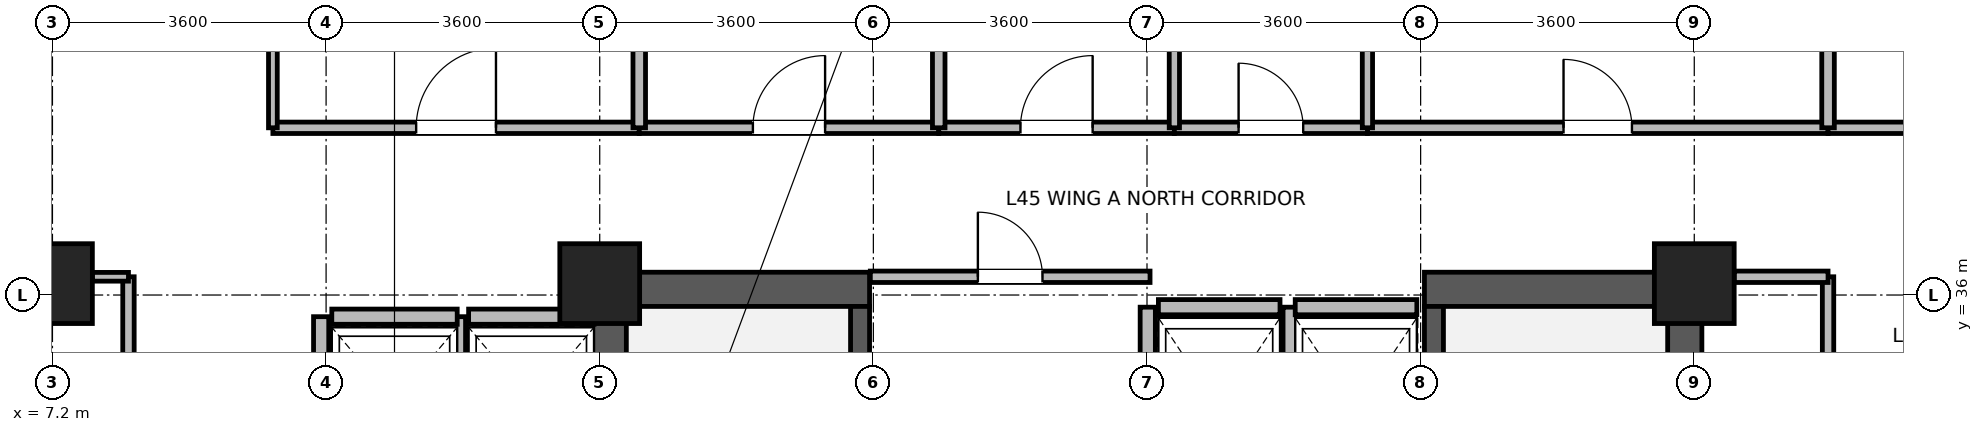
"""IFC4 building model, lengths in metres.
Left out: names, types, materials, properties, quantities, classifications, styles, units other than length and angle.
Written with IfcOpenShell. Run it as: python <this file> out.ifc"""

import sys

from ifc_helpers import new_model, si_unit, direction, frame, frame_2d, origin, origin_2d, place, context, subcontext, project, spatial, rectangle, extrude, source, transform, mapped, element, fill, save


model = new_model("IFC4")
c1 = context("Model", 3, precision=1e-05, world=origin(), true_north=direction((0.0, 1.0)))
c2 = subcontext(c1, "Body", "Model", "MODEL_VIEW")
j1 = project(units=[si_unit("LENGTHUNIT", "METRE"), si_unit("PLANEANGLEUNIT", "RADIAN")], contexts=[c1])
p1 = place(None, origin())
s1 = spatial("IfcSite", under=j1, at=p1, CompositionType="ELEMENT")
p2 = place(p1, origin())
s2 = spatial("IfcBuilding", under=s1, at=p2, CompositionType="ELEMENT")
p3 = place(p2, frame((0.0, 0.0, 177.2)))
s3 = spatial("IfcBuildingStorey", under=s2, at=p3, CompositionType="ELEMENT", Elevation=177.2)
for number, where, z_axis, x_axis in (
    (1, (14.525, 28.4, 0.0), (0.0, 0.0, 1.0), (0.0, 1.0, 0.0)),
    (2, (28.675, 28.4, 0.0), (0.0, 0.0, 1.0), (0.0, 1.0, 0.0)),
):
    element("IfcWall", number, at=place(p3, frame(where, z_axis=z_axis, x_axis=x_axis)), inside=s3, PredefinedType="SHEAR", context=c2, shape_type="SweptSolid", body=[
        extrude(rectangle(XDim=7.9, YDim=0.45, at=frame_2d((3.95, 0.0))), origin(), (0.0, 0.0, 1.0), 3.46),
    ])
for number, where, z_axis, x_axis in (
    (3, (14.75, 36.075, 0.0), (0.0, 0.0, 1.0), (1.0, 0.0, 0.0)),
    (4, (25.25, 36.075, 0.0), (0.0, 0.0, 1.0), (1.0, 0.0, 0.0)),
):
    element("IfcWall", number, at=place(p3, frame(where, z_axis=z_axis, x_axis=x_axis)), inside=s3, PredefinedType="SHEAR", context=c2, shape_type="SweptSolid", body=[
        extrude(rectangle(XDim=3.2, YDim=0.45, at=frame_2d((1.6, 0.0))), origin(), (0.0, 0.0, 1.0), 3.46),
    ])
p4 = place(p3, frame((17.825, 28.85, 0.0), z_axis=(0.0, 0.0, 1.0), x_axis=(0.0, 1.0, 0.0)))
e5 = element("IfcWall", 5, at=p4, inside=s3, PredefinedType="SHEAR", context=c2, shape_type="SweptSolid", body=[
    extrude(rectangle(XDim=7.0, YDim=0.25, at=frame_2d((3.5, 0.0))), origin(), (0.0, 0.0, 1.0), 3.46),
])
p5 = place(p4, frame((0.15, 0.0, 0.0)))
e6 = element("IfcOpeningElement", 6, at=p5, cuts=e5, PredefinedType="OPENING", context=c2, shape_type="SweptSolid", body=[
    extrude(rectangle(XDim=1.1, YDim=2.08, at=frame_2d((0.55, 1.04))), frame((0.0, 0.135, 0.0), z_axis=(0.0, -1.0, 0.0), x_axis=(1.0, 0.0, 0.0)), (0.0, 0.0, 1.0), 0.27),
])
p6 = place(p3, frame((25.375, 28.85, 0.0), z_axis=(0.0, 0.0, 1.0), x_axis=(0.0, 1.0, 0.0)))
e7 = element("IfcWall", 7, at=p6, inside=s3, PredefinedType="SHEAR", context=c2, shape_type="SweptSolid", body=[
    extrude(rectangle(XDim=7.0, YDim=0.25, at=frame_2d((3.5, 0.0))), origin(), (0.0, 0.0, 1.0), 3.46),
])
p7 = place(p6, frame((0.15, 0.0, 0.0)))
e8 = element("IfcOpeningElement", 8, at=p7, cuts=e7, PredefinedType="OPENING", context=c2, shape_type="SweptSolid", body=[
    extrude(rectangle(XDim=1.1, YDim=2.08, at=frame_2d((0.55, 1.04))), frame((0.0, 0.135, 0.0), z_axis=(0.0, -1.0, 0.0), x_axis=(1.0, 0.0, 0.0)), (0.0, 0.0, 1.0), 0.27),
])
m1 = source(origin(), c2, "Body", "SweptSolid", [
    extrude(rectangle(XDim=1.05, YDim=1.05, at=origin_2d()), origin(), (0.0, 0.0, 1.0), 3.7),
])
for number, where, z_axis, x_axis in (
    (9, (7.2, 36.15, 0.0), (0.0, 0.0, 1.0), (1.0, 0.0, 0.0)),
    (10, (14.4, 36.15, 0.0), (0.0, 0.0, 1.0), (1.0, 0.0, 0.0)),
    (11, (28.8, 36.15, 0.0), (0.0, 0.0, 1.0), (1.0, 0.0, 0.0)),
):
    element("IfcColumn", number, at=place(p3, frame(where, z_axis=z_axis, x_axis=x_axis)), inside=s3, PredefinedType="COLUMN", context=c2, shape_type="MappedRepresentation", body=[
        mapped(m1, transform((0.0, 0.0, 0.0), x_axis=(1.0, 0.0, 0.0), y_axis=(0.0, 1.0, 0.0), z_axis=(0.0, 0.0, 1.0), scale=1.0)),
    ])
p8 = place(p3, frame((12.675, 35.715, 0.0), z_axis=(0.0, 0.0, 1.0), x_axis=(1.0, 0.0, 0.0)))
e12 = element("IfcWall", 12, at=p8, inside=s3, PredefinedType="PARTITIONING", context=c2, shape_type="SweptSolid", body=[
    extrude(rectangle(XDim=1.65, YDim=0.2, at=frame_2d((0.825, 0.0))), origin(), (0.0, 0.0, 1.0), 3.44),
])
p9 = place(p3, frame((12.535, 33.485, 0.0), z_axis=(0.0, 0.0, 1.0), x_axis=(0.0, 1.0, 0.0)))
e13 = element("IfcWall", 13, at=p9, inside=s3, PredefinedType="PARTITIONING", context=c2, shape_type="SweptSolid", body=[
    extrude(rectangle(XDim=2.23, YDim=0.2, at=frame_2d((1.115, 0.0))), origin(), (0.0, 0.0, 1.0), 3.44),
])
p10 = place(p3, frame((10.875, 35.715, 0.0), z_axis=(0.0, 0.0, 1.0), x_axis=(1.0, 0.0, 0.0)))
e14 = element("IfcWall", 14, at=p10, inside=s3, PredefinedType="PARTITIONING", context=c2, shape_type="SweptSolid", body=[
    extrude(rectangle(XDim=1.65, YDim=0.2, at=frame_2d((0.825, 0.0))), origin(), (0.0, 0.0, 1.0), 3.44),
])
p11 = place(p3, frame((10.735, 33.485, 0.0), z_axis=(0.0, 0.0, 1.0), x_axis=(0.0, 1.0, 0.0)))
e15 = element("IfcWall", 15, at=p11, inside=s3, PredefinedType="PARTITIONING", context=c2, shape_type="SweptSolid", body=[
    extrude(rectangle(XDim=2.23, YDim=0.2, at=frame_2d((1.115, 0.0))), origin(), (0.0, 0.0, 1.0), 3.44),
])
p12 = place(p3, frame((21.75, 35.84, 0.0), z_axis=(0.0, 0.0, 1.0), x_axis=(1.0, 0.0, 0.0)))
e16 = element("IfcWall", 16, at=p12, inside=s3, PredefinedType="PARTITIONING", context=c2, shape_type="SweptSolid", body=[
    extrude(rectangle(XDim=1.6, YDim=0.2, at=frame_2d((0.8, 0.0))), origin(), (0.0, 0.0, 1.0), 2.44),
])
for number, where, z_axis, x_axis in (
    (17, (21.61, 33.16, 0.0), (0.0, 0.0, 1.0), (0.0, 1.0, 0.0)),
    (18, (23.49, 33.16, 0.0), (0.0, 0.0, 1.0), (0.0, 1.0, 0.0)),
):
    element("IfcWall", number, at=place(p3, frame(where, z_axis=z_axis, x_axis=x_axis)), inside=s3, PredefinedType="PARTITIONING", context=c2, shape_type="SweptSolid", body=[
        extrude(rectangle(XDim=2.68, YDim=0.2, at=frame_2d((1.34, 0.0))), origin(), (0.0, 0.0, 1.0), 3.44),
    ])
p13 = place(p3, frame((23.55, 35.84, 0.0), z_axis=(0.0, 0.0, 1.0), x_axis=(1.0, 0.0, 0.0)))
e19 = element("IfcWall", 19, at=p13, inside=s3, PredefinedType="PARTITIONING", context=c2, shape_type="SweptSolid", body=[
    extrude(rectangle(XDim=1.6, YDim=0.2, at=frame_2d((0.8, 0.0))), origin(), (0.0, 0.0, 1.0), 2.44),
])
p14 = place(p3, frame((24.5, 38.2, 0.0), z_axis=(0.0, 0.0, 1.0), x_axis=(1.0, 0.0, 0.0)))
e20 = element("IfcWall", 20, at=p14, inside=s3, PredefinedType="PARTITIONING", context=c2, shape_type="SweptSolid", body=[
    extrude(rectangle(XDim=6.06, YDim=0.15, at=frame_2d((3.03, 0.0))), origin(), (0.0, 0.0, 1.0), 3.44),
])
p15 = place(p14, frame((2.58, 0.0, 0.0)))
e21 = element("IfcOpeningElement", 21, at=p15, cuts=e20, PredefinedType="OPENING", context=c2, shape_type="SweptSolid", body=[
    extrude(rectangle(XDim=0.9, YDim=2.08, at=frame_2d((0.45, 1.04))), frame((0.0, 0.085, 0.0), z_axis=(0.0, -1.0, 0.0), x_axis=(1.0, 0.0, 0.0)), (0.0, 0.0, 1.0), 0.17),
])
p16 = place(p3, frame((10.1, 38.2, 0.0), z_axis=(0.0, 0.0, 1.0), x_axis=(1.0, 0.0, 0.0)))
e22 = element("IfcWall", 22, at=p16, inside=s3, PredefinedType="PARTITIONING", context=c2, shape_type="SweptSolid", body=[
    extrude(rectangle(XDim=4.82, YDim=0.15, at=frame_2d((2.41, 0.0))), origin(), (0.0, 0.0, 1.0), 3.44),
])
p17 = place(p16, frame((1.885, 0.0, 0.0)))
e23 = element("IfcOpeningElement", 23, at=p17, cuts=e22, PredefinedType="OPENING", context=c2, shape_type="SweptSolid", body=[
    extrude(rectangle(XDim=1.05, YDim=2.12, at=frame_2d((0.525, 1.06))), frame((0.0, 0.085, 0.0), z_axis=(0.0, -1.0, 0.0), x_axis=(1.0, 0.0, 0.0)), (0.0, 0.0, 1.0), 0.17),
])
p18 = place(p3, frame((30.56, 38.2, 0.0), z_axis=(0.0, 0.0, 1.0), x_axis=(1.0, 0.0, 0.0)))
e24 = element("IfcWall", 24, at=p18, inside=s3, PredefinedType="PARTITIONING", context=c2, shape_type="SweptSolid", body=[
    extrude(rectangle(XDim=4.8, YDim=0.15, at=frame_2d((2.4, 0.0))), origin(), (0.0, 0.0, 1.0), 3.44),
])
p19 = place(p18, frame((1.75, 0.0, 0.0)))
e25 = element("IfcOpeningElement", 25, at=p19, cuts=e24, PredefinedType="OPENING", context=c2, shape_type="SweptSolid", body=[
    extrude(rectangle(XDim=1.3, YDim=2.12, at=frame_2d((0.65, 1.06))), frame((0.0, 0.085, 0.0), z_axis=(0.0, -1.0, 0.0), x_axis=(1.0, 0.0, 0.0)), (0.0, 0.0, 1.0), 0.17),
])
p20 = place(p3, frame((14.92, 38.2, 0.0), z_axis=(0.0, 0.0, 1.0), x_axis=(1.0, 0.0, 0.0)))
e26 = element("IfcWall", 26, at=p20, inside=s3, PredefinedType="PARTITIONING", context=c2, shape_type="SweptSolid", body=[
    extrude(rectangle(XDim=3.94, YDim=0.15, at=frame_2d((1.97, 0.0))), origin(), (0.0, 0.0, 1.0), 3.44),
])
p21 = place(p20, frame((1.495, 0.0, 0.0)))
e27 = element("IfcOpeningElement", 27, at=p21, cuts=e26, PredefinedType="OPENING", context=c2, shape_type="SweptSolid", body=[
    extrude(rectangle(XDim=0.95, YDim=2.1, at=frame_2d((0.475, 1.05))), frame((0.0, 0.085, 0.0), z_axis=(0.0, -1.0, 0.0), x_axis=(1.0, 0.0, 0.0)), (0.0, 0.0, 1.0), 0.17),
])
p22 = place(p3, frame((8.2, 32.4, 0.0), z_axis=(0.0, 0.0, 1.0), x_axis=(0.0, 1.0, 0.0)))
e28 = element("IfcWall", 28, at=p22, inside=s3, PredefinedType="PARTITIONING", context=c2, shape_type="SweptSolid", body=[
    extrude(rectangle(XDim=3.84, YDim=0.15, at=frame_2d((1.92, 0.0))), origin(), (0.0, 0.0, 1.0), 3.44),
])
p23 = place(p22, frame((1.27, 0.0, 0.0)))
e29 = element("IfcOpeningElement", 29, at=p23, cuts=e28, PredefinedType="OPENING", context=c2, shape_type="SweptSolid", body=[
    extrude(rectangle(XDim=1.3, YDim=2.12, at=frame_2d((0.65, 1.06))), frame((0.0, 0.085, 0.0), z_axis=(0.0, -1.0, 0.0), x_axis=(1.0, 0.0, 0.0)), (0.0, 0.0, 1.0), 0.17),
])
p24 = place(p3, frame((30.56, 32.4, 0.0), z_axis=(0.0, 0.0, 1.0), x_axis=(0.0, 1.0, 0.0)))
e30 = element("IfcWall", 30, at=p24, inside=s3, PredefinedType="PARTITIONING", context=c2, shape_type="SweptSolid", body=[
    extrude(rectangle(XDim=3.84, YDim=0.15, at=frame_2d((1.92, 0.0))), origin(), (0.0, 0.0, 1.0), 3.44),
])
p25 = place(p24, frame((1.27, 0.0, 0.0)))
e31 = element("IfcOpeningElement", 31, at=p25, cuts=e30, PredefinedType="OPENING", context=c2, shape_type="SweptSolid", body=[
    extrude(rectangle(XDim=1.3, YDim=2.12, at=frame_2d((0.65, 1.06))), frame((0.0, 0.085, 0.0), z_axis=(0.0, -1.0, 0.0), x_axis=(1.0, 0.0, 0.0)), (0.0, 0.0, 1.0), 0.17),
])
p26 = place(p3, frame((17.96, 36.24, 0.0), z_axis=(0.0, 0.0, 1.0), x_axis=(1.0, 0.0, 0.0)))
e32 = element("IfcWall", 32, at=p26, inside=s3, PredefinedType="PARTITIONING", context=c2, shape_type="SweptSolid", body=[
    extrude(rectangle(XDim=3.68, YDim=0.15, at=frame_2d((1.84, 0.0))), origin(), (0.0, 0.0, 1.0), 2.44),
])
p27 = place(p26, frame((1.415, 0.0, 0.0)))
e33 = element("IfcOpeningElement", 33, at=p27, cuts=e32, PredefinedType="OPENING", context=c2, shape_type="SweptSolid", body=[
    extrude(rectangle(XDim=0.85, YDim=2.04, at=frame_2d((0.425, 1.02))), frame((0.0, 0.085, 0.0), z_axis=(0.0, -1.0, 0.0), x_axis=(1.0, 0.0, 0.0)), (0.0, 0.0, 1.0), 0.17),
])
p28 = place(p3, frame((18.86, 38.2, 0.0), z_axis=(0.0, 0.0, 1.0), x_axis=(1.0, 0.0, 0.0)))
e34 = element("IfcWall", 34, at=p28, inside=s3, PredefinedType="PARTITIONING", context=c2, shape_type="SweptSolid", body=[
    extrude(rectangle(XDim=3.1, YDim=0.15, at=frame_2d((1.55, 0.0))), origin(), (0.0, 0.0, 1.0), 3.44),
])
p29 = place(p28, frame((1.075, 0.0, 0.0)))
e35 = element("IfcOpeningElement", 35, at=p29, cuts=e34, PredefinedType="OPENING", context=c2, shape_type="SweptSolid", body=[
    extrude(rectangle(XDim=0.95, YDim=2.1, at=frame_2d((0.475, 1.05))), frame((0.0, 0.085, 0.0), z_axis=(0.0, -1.0, 0.0), x_axis=(1.0, 0.0, 0.0)), (0.0, 0.0, 1.0), 0.17),
])
p30 = place(p3, frame((21.96, 38.2, 0.0), z_axis=(0.0, 0.0, 1.0), x_axis=(1.0, 0.0, 0.0)))
e36 = element("IfcWall", 36, at=p30, inside=s3, PredefinedType="PARTITIONING", context=c2, shape_type="SweptSolid", body=[
    extrude(rectangle(XDim=2.54, YDim=0.15, at=frame_2d((1.27, 0.0))), origin(), (0.0, 0.0, 1.0), 3.44),
])
p31 = place(p30, frame((0.845, 0.0, 0.0)))
e37 = element("IfcOpeningElement", 37, at=p31, cuts=e36, PredefinedType="OPENING", context=c2, shape_type="SweptSolid", body=[
    extrude(rectangle(XDim=0.85, YDim=2.04, at=frame_2d((0.425, 1.02))), frame((0.0, 0.085, 0.0), z_axis=(0.0, -1.0, 0.0), x_axis=(1.0, 0.0, 0.0)), (0.0, 0.0, 1.0), 0.17),
])
p32 = place(p3, frame((29.325, 36.24, 0.0), z_axis=(0.0, 0.0, 1.0), x_axis=(1.0, 0.0, 0.0)))
e38 = element("IfcWall", 38, at=p32, inside=s3, PredefinedType="PARTITIONING", context=c2, shape_type="SweptSolid", body=[
    extrude(rectangle(XDim=1.235, YDim=0.15, at=frame_2d((0.618, 0.0))), origin(), (0.0, 0.0, 1.0), 2.84),
])
p33 = place(p3, frame((7.725, 36.24, 0.0), z_axis=(0.0, 0.0, 1.0), x_axis=(1.0, 0.0, 0.0)))
e39 = element("IfcWall", 39, at=p33, inside=s3, PredefinedType="PARTITIONING", context=c2, shape_type="SweptSolid", body=[
    extrude(rectangle(XDim=0.475, YDim=0.115, at=frame_2d((0.237, 0.0))), origin(), (0.0, 0.0, 1.0), 2.84),
])
for number, where, z_axis, x_axis in (
    (40, (14.92, 38.2, 0.0), (0.0, 0.0, 1.0), (0.0, 1.0, 0.0)),
    (41, (18.86, 38.2, 0.0), (0.0, 0.0, 1.0), (0.0, 1.0, 0.0)),
):
    element("IfcWall", number, at=place(p3, frame(where, z_axis=z_axis, x_axis=x_axis)), inside=s3, PredefinedType="PARTITIONING", context=c2, shape_type="SweptSolid", body=[
        extrude(rectangle(XDim=4.868, YDim=0.165, at=frame_2d((2.434, 0.0))), origin(), (0.0, 0.0, 1.0), 3.44),
    ])
for number, where, z_axis, x_axis in (
    (42, (21.96, 38.2, 0.0), (0.0, 0.0, 1.0), (0.0, 1.0, 0.0)),
    (43, (24.5, 38.2, 0.0), (0.0, 0.0, 1.0), (0.0, 1.0, 0.0)),
):
    element("IfcWall", number, at=place(p3, frame(where, z_axis=z_axis, x_axis=x_axis)), inside=s3, PredefinedType="PARTITIONING", context=c2, shape_type="SweptSolid", body=[
        extrude(rectangle(XDim=4.868, YDim=0.135, at=frame_2d((2.434, 0.0))), origin(), (0.0, 0.0, 1.0), 3.44),
    ])
p34 = place(p3, frame((30.56, 38.2, 0.0), z_axis=(0.0, 0.0, 1.0), x_axis=(0.0, 1.0, 0.0)))
e44 = element("IfcWall", 44, at=p34, inside=s3, PredefinedType="PARTITIONING", context=c2, shape_type="SweptSolid", body=[
    extrude(rectangle(XDim=4.868, YDim=0.165, at=frame_2d((2.434, 0.0))), origin(), (0.0, 0.0, 1.0), 3.44),
])
p35 = place(p3, frame((10.1, 38.2, 0.0), z_axis=(0.0, 0.0, 1.0), x_axis=(0.0, 1.0, 0.0)))
e45 = element("IfcWall", 45, at=p35, inside=s3, PredefinedType="PARTITIONING", context=c2, shape_type="SweptSolid", body=[
    extrude(rectangle(XDim=1.268, YDim=0.115, at=frame_2d((0.634, 0.0))), origin(), (0.0, 0.0, 1.0), 3.44),
])
p36 = place(p15, origin())
e46 = element("IfcDoor", 46, at=p36, inside=s3, OperationType="SINGLE_SWING_LEFT", PredefinedType="DOOR", context=c2, shape_type="SweptSolid", body=[
    extrude(rectangle(XDim=0.9, YDim=2.08, at=frame_2d((0.45, 1.04))), frame((0.0, 0.025, 0.0), z_axis=(0.0, -1.0, 0.0), x_axis=(1.0, 0.0, 0.0)), (0.0, 0.0, 1.0), 0.05),
])
fill(e21, e46)
p37 = place(p17, origin())
e47 = element("IfcDoor", 47, at=p37, inside=s3, OperationType="SINGLE_SWING_RIGHT", PredefinedType="DOOR", context=c2, shape_type="SweptSolid", body=[
    extrude(rectangle(XDim=1.05, YDim=2.12, at=frame_2d((0.525, 1.06))), frame((0.0, 0.025, 0.0), z_axis=(0.0, -1.0, 0.0), x_axis=(1.0, 0.0, 0.0)), (0.0, 0.0, 1.0), 0.05),
])
fill(e23, e47)
p38 = place(p21, origin())
e48 = element("IfcDoor", 48, at=p38, inside=s3, OperationType="SINGLE_SWING_RIGHT", PredefinedType="DOOR", context=c2, shape_type="SweptSolid", body=[
    extrude(rectangle(XDim=0.95, YDim=2.1, at=frame_2d((0.475, 1.05))), frame((0.0, 0.025, 0.0), z_axis=(0.0, -1.0, 0.0), x_axis=(1.0, 0.0, 0.0)), (0.0, 0.0, 1.0), 0.05),
])
fill(e27, e48)
p39 = place(p27, origin())
e49 = element("IfcDoor", 49, at=p39, inside=s3, OperationType="SINGLE_SWING_LEFT", PredefinedType="DOOR", context=c2, shape_type="SweptSolid", body=[
    extrude(rectangle(XDim=0.85, YDim=2.04, at=frame_2d((0.425, 1.02))), frame((0.0, 0.025, 0.0), z_axis=(0.0, -1.0, 0.0), x_axis=(1.0, 0.0, 0.0)), (0.0, 0.0, 1.0), 0.05),
])
fill(e33, e49)
p40 = place(p29, origin())
e50 = element("IfcDoor", 50, at=p40, inside=s3, OperationType="SINGLE_SWING_RIGHT", PredefinedType="DOOR", context=c2, shape_type="SweptSolid", body=[
    extrude(rectangle(XDim=0.95, YDim=2.1, at=frame_2d((0.475, 1.05))), frame((0.0, 0.025, 0.0), z_axis=(0.0, -1.0, 0.0), x_axis=(1.0, 0.0, 0.0)), (0.0, 0.0, 1.0), 0.05),
])
fill(e35, e50)
p41 = place(p31, origin())
e51 = element("IfcDoor", 51, at=p41, inside=s3, OperationType="SINGLE_SWING_LEFT", PredefinedType="DOOR", context=c2, shape_type="SweptSolid", body=[
    extrude(rectangle(XDim=0.85, YDim=2.04, at=frame_2d((0.425, 1.02))), frame((0.0, 0.025, 0.0), z_axis=(0.0, -1.0, 0.0), x_axis=(1.0, 0.0, 0.0)), (0.0, 0.0, 1.0), 0.05),
])
fill(e37, e51)
save(model, sys.argv[1])
